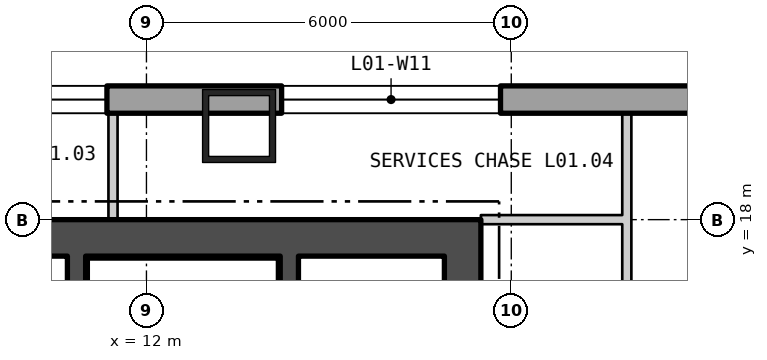
"""IFC4 building model, lengths in metres.
Left out: names, types, materials, properties, quantities, classifications, styles, units other than length and angle.
Written with IfcOpenShell. Run it as: python <this file> out.ifc"""

import sys

from ifc_helpers import new_model, si_unit, direction, frame, frame_2d, origin, origin_2d, place, context, subcontext, project, spatial, polyline, rectangle, hollow_rectangle, outline, extrude, element, fill, save


model = new_model("IFC4")
c1 = context("Model", 3, precision=1e-05, world=origin(), true_north=direction((0.0, 1.0)))
c2 = subcontext(c1, "Body", "Model", "MODEL_VIEW")
j1 = project(units=[si_unit("LENGTHUNIT", "METRE"), si_unit("PLANEANGLEUNIT", "RADIAN")], contexts=[c1])
p1 = place(None, origin())
s1 = spatial("IfcSite", under=j1, at=p1, CompositionType="ELEMENT")
p2 = place(p1, origin())
s2 = spatial("IfcBuilding", under=s1, at=p2, CompositionType="ELEMENT")
p3 = place(p2, frame((0.0, 0.0, 8.4)))
s3 = spatial("IfcBuildingStorey", under=s2, at=p3, CompositionType="ELEMENT", Elevation=8.4)
p4 = place(p3, frame((13.523, 19.54, 0.0), z_axis=(0.0, 0.0, 1.0), x_axis=(-1.0, 0.0, 0.0)))
e1 = element("IfcColumn", 1, at=p4, inside=s3, PredefinedType="COLUMN", context=c2, shape_type="SweptSolid", body=[
    extrude(hollow_rectangle(XDim=1.2, YDim=1.2, WallThickness=0.1, at=origin_2d()), origin(), (0.0, 0.0, 1.0), 5.1),
])
p5 = place(p3, frame((38.775, 19.975, -0.4), z_axis=(0.0, 0.0, 1.0), x_axis=(-1.0, 0.0, 0.0)))
e2 = element("IfcWall", 2, at=p5, inside=s3, PredefinedType="SOLIDWALL", context=c2, shape_type="SweptSolid", body=[
    extrude(outline(polyline([(-0.225, -0.225), (77.775, -0.225), (77.325, 0.225), (0.225, 0.225), (-0.225, -0.225)])), origin(), (0.0, 0.0, 1.0), 5.1),
])
p6 = place(p5, frame((1.958, 0.0, 1.3)))
e3 = element("IfcOpeningElement", 3, at=p6, cuts=e2, PredefinedType="OPENING", context=c2, shape_type="SweptSolid", body=[
    extrude(rectangle(XDim=3.6, YDim=3.2, at=frame_2d((1.8, 1.6))), frame((0.0, 0.235, 0.0), z_axis=(0.0, -1.0, 0.0), x_axis=(1.0, 0.0, 0.0)), (0.0, 0.0, 1.0), 0.47),
])
p7 = place(p5, frame((8.325, 0.0, 1.3)))
e4 = element("IfcOpeningElement", 4, at=p7, cuts=e2, PredefinedType="OPENING", context=c2, shape_type="SweptSolid", body=[
    extrude(rectangle(XDim=3.6, YDim=3.2, at=frame_2d((1.8, 1.6))), frame((0.0, 0.235, 0.0), z_axis=(0.0, -1.0, 0.0), x_axis=(1.0, 0.0, 0.0)), (0.0, 0.0, 1.0), 0.47),
])
p8 = place(p5, frame((20.952, 0.0, 1.3)))
e5 = element("IfcOpeningElement", 5, at=p8, cuts=e2, PredefinedType="OPENING", context=c2, shape_type="SweptSolid", body=[
    extrude(rectangle(XDim=3.6, YDim=3.2, at=frame_2d((1.8, 1.6))), frame((0.0, 0.235, 0.0), z_axis=(0.0, -1.0, 0.0), x_axis=(1.0, 0.0, 0.0)), (0.0, 0.0, 1.0), 0.47),
])
p9 = place(p5, frame((27.425, 0.0, 1.3)))
e6 = element("IfcOpeningElement", 6, at=p9, cuts=e2, PredefinedType="OPENING", context=c2, shape_type="SweptSolid", body=[
    extrude(rectangle(XDim=3.6, YDim=3.2, at=frame_2d((1.8, 1.6))), frame((0.0, 0.235, 0.0), z_axis=(0.0, -1.0, 0.0), x_axis=(1.0, 0.0, 0.0)), (0.0, 0.0, 1.0), 0.47),
])
p10 = place(p5, frame((46.525, 0.0, 1.3)))
e7 = element("IfcOpeningElement", 7, at=p10, cuts=e2, PredefinedType="OPENING", context=c2, shape_type="SweptSolid", body=[
    extrude(rectangle(XDim=3.6, YDim=3.2, at=frame_2d((1.8, 1.6))), frame((0.0, 0.235, 0.0), z_axis=(0.0, -1.0, 0.0), x_axis=(1.0, 0.0, 0.0)), (0.0, 0.0, 1.0), 0.47),
])
p11 = place(p5, frame((52.998, 0.0, 1.3)))
e8 = element("IfcOpeningElement", 8, at=p11, cuts=e2, PredefinedType="OPENING", context=c2, shape_type="SweptSolid", body=[
    extrude(rectangle(XDim=3.6, YDim=3.2, at=frame_2d((1.8, 1.6))), frame((0.0, 0.235, 0.0), z_axis=(0.0, -1.0, 0.0), x_axis=(1.0, 0.0, 0.0)), (0.0, 0.0, 1.0), 0.47),
])
p12 = place(p5, frame((65.625, 0.0, 1.3)))
e9 = element("IfcOpeningElement", 9, at=p12, cuts=e2, PredefinedType="OPENING", context=c2, shape_type="SweptSolid", body=[
    extrude(rectangle(XDim=3.6, YDim=3.2, at=frame_2d((1.8, 1.6))), frame((0.0, 0.235, 0.0), z_axis=(0.0, -1.0, 0.0), x_axis=(1.0, 0.0, 0.0)), (0.0, 0.0, 1.0), 0.47),
])
p13 = place(p5, frame((71.992, 0.0, 1.3)))
e10 = element("IfcOpeningElement", 10, at=p13, cuts=e2, PredefinedType="OPENING", context=c2, shape_type="SweptSolid", body=[
    extrude(rectangle(XDim=3.6, YDim=3.2, at=frame_2d((1.8, 1.6))), frame((0.0, 0.235, 0.0), z_axis=(0.0, -1.0, 0.0), x_axis=(1.0, 0.0, 0.0)), (0.0, 0.0, 1.0), 0.47),
])
p14 = place(p3, frame((-17.5, 17.7, 0.0), z_axis=(0.0, 0.0, 1.0), x_axis=(1.0, 0.0, 0.0)))
e11 = element("IfcWall", 11, at=p14, inside=s3, PredefinedType="SHEAR", context=c2, shape_type="SweptSolid", body=[
    extrude(rectangle(XDim=35.0, YDim=0.6, at=frame_2d((17.5, 0.0))), origin(), (0.0, 0.0, 1.0), 4.88),
])
p15 = place(p3, frame((17.2, 0.6, 0.0), z_axis=(0.0, 0.0, 1.0), x_axis=(0.0, 1.0, 0.0)))
e12 = element("IfcWall", 12, at=p15, inside=s3, PredefinedType="SHEAR", context=c2, shape_type="SweptSolid", body=[
    extrude(rectangle(XDim=16.8, YDim=0.6, at=frame_2d((8.4, 0.0))), origin(), (0.0, 0.0, 1.0), 4.88),
])
p16 = place(p15, frame((5.7, 0.0, 0.0)))
e13 = element("IfcOpeningElement", 13, at=p16, cuts=e12, PredefinedType="OPENING", context=c2, shape_type="SweptSolid", body=[
    extrude(rectangle(XDim=1.5, YDim=2.1, at=frame_2d((0.75, 1.05))), frame((0.0, 0.31, 0.0), z_axis=(0.0, -1.0, 0.0), x_axis=(1.0, 0.0, 0.0)), (0.0, 0.0, 1.0), 0.62),
])
p17 = place(p15, frame((0.618, 0.0, 0.0)))
e14 = element("IfcOpeningElement", 14, at=p17, cuts=e12, PredefinedType="OPENING", context=c2, shape_type="SweptSolid", body=[
    extrude(rectangle(XDim=1.0, YDim=2.1, at=frame_2d((0.5, 1.05))), frame((0.0, 0.31, 0.0), z_axis=(0.0, -1.0, 0.0), x_axis=(1.0, 0.0, 0.0)), (0.0, 0.0, 1.0), 0.62),
])
p18 = place(p15, frame((3.518, 0.0, 0.0)))
e15 = element("IfcOpeningElement", 15, at=p18, cuts=e12, PredefinedType="OPENING", context=c2, shape_type="SweptSolid", body=[
    extrude(rectangle(XDim=0.9, YDim=2.1, at=frame_2d((0.45, 1.05))), frame((0.0, 0.31, 0.0), z_axis=(0.0, -1.0, 0.0), x_axis=(1.0, 0.0, 0.0)), (0.0, 0.0, 1.0), 0.62),
])
p19 = place(p15, frame((8.853, 0.0, 0.0)))
e16 = element("IfcOpeningElement", 16, at=p19, cuts=e12, PredefinedType="OPENING", context=c2, shape_type="SweptSolid", body=[
    extrude(rectangle(XDim=0.9, YDim=2.1, at=frame_2d((0.45, 1.05))), frame((0.0, 0.31, 0.0), z_axis=(0.0, -1.0, 0.0), x_axis=(1.0, 0.0, 0.0)), (0.0, 0.0, 1.0), 0.62),
])
p20 = place(p15, frame((13.653, 0.0, 0.0)))
e17 = element("IfcOpeningElement", 17, at=p20, cuts=e12, PredefinedType="OPENING", context=c2, shape_type="SweptSolid", body=[
    extrude(rectangle(XDim=0.9, YDim=2.1, at=frame_2d((0.45, 1.05))), frame((0.0, 0.31, 0.0), z_axis=(0.0, -1.0, 0.0), x_axis=(1.0, 0.0, 0.0)), (0.0, 0.0, 1.0), 0.62),
])
p21 = place(p3, frame((10.85, 0.6, 0.0), z_axis=(0.0, 0.0, 1.0), x_axis=(0.0, 1.0, 0.0)))
e18 = element("IfcWall", 18, at=p21, inside=s3, PredefinedType="SHEAR", context=c2, shape_type="SweptSolid", body=[
    extrude(rectangle(XDim=16.8, YDim=0.3, at=frame_2d((8.4, 0.0))), origin(), (0.0, 0.0, 1.0), 4.88),
])
p22 = place(p21, frame((5.075, 0.0, 0.0)))
e19 = element("IfcOpeningElement", 19, at=p22, cuts=e18, PredefinedType="OPENING", context=c2, shape_type="SweptSolid", body=[
    extrude(rectangle(XDim=1.25, YDim=2.1, at=frame_2d((0.625, 1.05))), frame((0.0, 0.16, 0.0), z_axis=(0.0, -1.0, 0.0), x_axis=(1.0, 0.0, 0.0)), (0.0, 0.0, 1.0), 0.32),
])
p23 = place(p21, frame((1.525, 0.0, 0.0)))
e20 = element("IfcOpeningElement", 20, at=p23, cuts=e18, PredefinedType="OPENING", context=c2, shape_type="SweptSolid", body=[
    extrude(rectangle(XDim=1.0, YDim=2.1, at=frame_2d((0.5, 1.05))), frame((0.0, 0.16, 0.0), z_axis=(0.0, -1.0, 0.0), x_axis=(1.0, 0.0, 0.0)), (0.0, 0.0, 1.0), 0.32),
])
p24 = place(p3, frame((14.35, 0.6, 0.0), z_axis=(0.0, 0.0, 1.0), x_axis=(0.0, 1.0, 0.0)))
e21 = element("IfcWall", 21, at=p24, inside=s3, PredefinedType="SHEAR", context=c2, shape_type="SweptSolid", body=[
    extrude(rectangle(XDim=16.8, YDim=0.3, at=frame_2d((8.4, 0.0))), origin(), (0.0, 0.0, 1.0), 4.88),
])
p25 = place(p24, frame((5.7, 0.0, 0.0)))
e22 = element("IfcOpeningElement", 22, at=p25, cuts=e21, PredefinedType="OPENING", context=c2, shape_type="SweptSolid", body=[
    extrude(rectangle(XDim=1.5, YDim=2.1, at=frame_2d((0.75, 1.05))), frame((0.0, 0.16, 0.0), z_axis=(0.0, -1.0, 0.0), x_axis=(1.0, 0.0, 0.0)), (0.0, 0.0, 1.0), 0.32),
])
p26 = place(p3, frame((11.45, 18.0, 0.0), z_axis=(0.0, 0.0, 1.0), x_axis=(0.0, 1.0, 0.0)))
e23 = element("IfcWall", 23, at=p26, inside=s3, PredefinedType="PARTITIONING", context=c2, shape_type="SweptSolid", body=[
    extrude(rectangle(XDim=1.75, YDim=0.15, at=frame_2d((0.875, 0.0))), origin(), (0.0, 0.0, 1.0), 4.88),
])
p27 = place(p3, frame((17.5, 18.0, 0.0), z_axis=(0.0, 0.0, 1.0), x_axis=(1.0, 0.0, 0.0)))
e24 = element("IfcWall", 24, at=p27, inside=s3, PredefinedType="PARTITIONING", context=c2, shape_type="SweptSolid", body=[
    extrude(rectangle(XDim=2.475, YDim=0.15, at=frame_2d((1.238, 0.0))), origin(), (0.0, 0.0, 1.0), 4.33),
])
p28 = place(p3, frame((19.9, -0.211, 0.0), z_axis=(0.0, 0.0, 1.0), x_axis=(0.0, 1.0, 0.0)))
e25 = element("IfcWall", 25, at=p28, inside=s3, PredefinedType="PARTITIONING", context=c2, shape_type="SweptSolid", body=[
    extrude(rectangle(XDim=18.136, YDim=0.15, at=frame_2d((9.068, 0.0))), origin(), (0.0, 0.0, 1.0), 4.88),
])
p29 = place(p28, frame((8.174, 0.0, 0.0)))
e26 = element("IfcOpeningElement", 26, at=p29, cuts=e25, PredefinedType="OPENING", context=c2, shape_type="SweptSolid", body=[
    extrude(rectangle(XDim=1.0, YDim=2.1, at=frame_2d((0.5, 1.05))), frame((0.0, 0.085, 0.0), z_axis=(0.0, -1.0, 0.0), x_axis=(1.0, 0.0, 0.0)), (0.0, 0.0, 1.0), 0.17),
])
p30 = place(p3, frame((19.9, 18.075, 0.0), z_axis=(0.0, 0.0, 1.0), x_axis=(0.0, 1.0, 0.0)))
e27 = element("IfcWall", 27, at=p30, inside=s3, PredefinedType="PARTITIONING", context=c2, shape_type="SweptSolid", body=[
    extrude(rectangle(XDim=1.675, YDim=0.15, at=frame_2d((0.838, 0.0))), origin(), (0.0, 0.0, 1.0), 4.88),
])
p31 = place(p8, origin())
e28 = element("IfcWindow", 28, at=p31, inside=s3, PartitioningType="SINGLE_PANEL", PredefinedType="WINDOW", context=c2, shape_type="SweptSolid", body=[
    extrude(rectangle(XDim=3.6, YDim=3.2, at=frame_2d((1.8, 1.6))), frame((0.0, 0.105, 0.0), z_axis=(0.0, -1.0, 0.0), x_axis=(1.0, 0.0, 0.0)), (0.0, 0.0, 1.0), 0.06),
])
fill(e5, e28)
p32 = place(p9, origin())
e29 = element("IfcWindow", 29, at=p32, inside=s3, PartitioningType="SINGLE_PANEL", PredefinedType="WINDOW", context=c2, shape_type="SweptSolid", body=[
    extrude(rectangle(XDim=3.6, YDim=3.2, at=frame_2d((1.8, 1.6))), frame((0.0, 0.105, 0.0), z_axis=(0.0, -1.0, 0.0), x_axis=(1.0, 0.0, 0.0)), (0.0, 0.0, 1.0), 0.06),
])
fill(e6, e29)
save(model, sys.argv[1])
